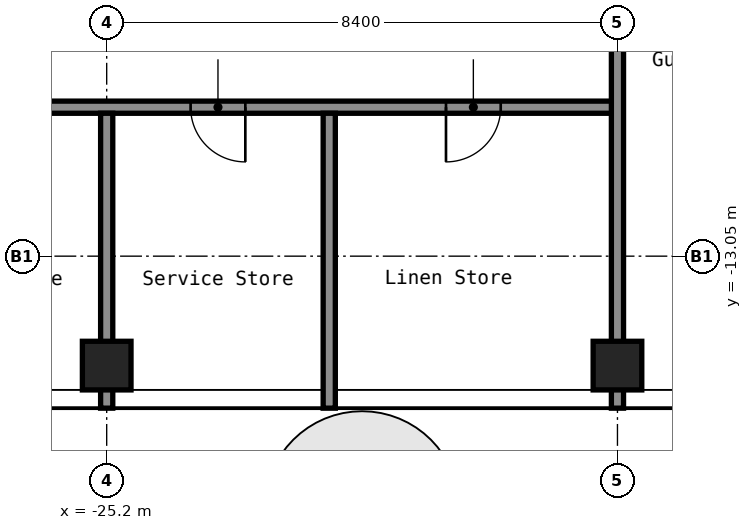
"""IFC4 building model, lengths in metres.
Left out: names, types, materials, properties, quantities, classifications, styles, units other than length and angle.
Written with IfcOpenShell. Run it as: python <this file> out.ifc"""

import sys

from ifc_helpers import new_model, si_unit, direction, frame, frame_2d, origin, origin_2d, place, context, subcontext, project, spatial, rectangle, hollow_rectangle, extrude, element, fill, save


model = new_model("IFC4")
c1 = context("Model", 3, precision=1e-05, world=origin(), true_north=direction((0.0, 1.0)))
c2 = subcontext(c1, "Body", "Model", "MODEL_VIEW")
j1 = project(units=[si_unit("LENGTHUNIT", "METRE"), si_unit("PLANEANGLEUNIT", "RADIAN")], contexts=[c1])
p1 = place(None, origin())
s1 = spatial("IfcSite", under=j1, at=p1, CompositionType="ELEMENT")
p2 = place(p1, origin())
s2 = spatial("IfcBuilding", under=s1, at=p2, CompositionType="ELEMENT")
p3 = place(p2, frame((0.0, 0.0, 85.0)))
s3 = spatial("IfcBuildingStorey", under=s2, at=p3, CompositionType="ELEMENT", Elevation=85.0)
for number, where, z_axis, x_axis in (
    (1, (-25.2, -14.85, 0.0), (0.0, 0.0, 1.0), (1.0, 0.0, 0.0)),
    (2, (-16.8, -14.85, 0.0), (0.0, 0.0, 1.0), (1.0, 0.0, 0.0)),
):
    element("IfcColumn", number, at=place(p3, frame(where, z_axis=z_axis, x_axis=x_axis)), inside=s3, PredefinedType="COLUMN", context=c2, shape_type="SweptSolid", body=[
        extrude(hollow_rectangle(XDim=0.8, YDim=0.8, WallThickness=0.032, at=origin_2d()), origin(), (0.0, 0.0, 1.0), 2.8),
    ])
p4 = place(p3, frame((-46.5, -10.6, 0.0), z_axis=(0.0, 0.0, 1.0), x_axis=(1.0, 0.0, 0.0)))
e3 = element("IfcWall", 3, at=p4, inside=s3, PredefinedType="PARTITIONING", context=c2, shape_type="SweptSolid", body=[
    extrude(rectangle(XDim=29.7, YDim=0.2, at=frame_2d((14.85, 0.0))), origin(), (0.0, 0.0, 1.0), 2.8),
])
p5 = place(p4, frame((1.95, 0.0, 0.0)))
e4 = element("IfcOpeningElement", 4, at=p5, cuts=e3, PredefinedType="OPENING", context=c2, shape_type="SweptSolid", body=[
    extrude(rectangle(XDim=0.9, YDim=2.1, at=frame_2d((0.45, 1.05))), frame((0.0, 0.11, 0.0), z_axis=(0.0, -1.0, 0.0), x_axis=(1.0, 0.0, 0.0)), (0.0, 0.0, 1.0), 0.22),
])
p6 = place(p4, frame((5.98, 0.0, 0.0)))
e5 = element("IfcOpeningElement", 5, at=p6, cuts=e3, PredefinedType="OPENING", context=c2, shape_type="SweptSolid", body=[
    extrude(rectangle(XDim=0.9, YDim=2.1, at=frame_2d((0.45, 1.05))), frame((0.0, 0.11, 0.0), z_axis=(0.0, -1.0, 0.0), x_axis=(1.0, 0.0, 0.0)), (0.0, 0.0, 1.0), 0.22),
])
p7 = place(p4, frame((10.18, 0.0, 0.0)))
e6 = element("IfcOpeningElement", 6, at=p7, cuts=e3, PredefinedType="OPENING", context=c2, shape_type="SweptSolid", body=[
    extrude(rectangle(XDim=0.9, YDim=2.1, at=frame_2d((0.45, 1.05))), frame((0.0, 0.11, 0.0), z_axis=(0.0, -1.0, 0.0), x_axis=(1.0, 0.0, 0.0)), (0.0, 0.0, 1.0), 0.22),
])
p8 = place(p4, frame((14.885, 0.0, 0.0)))
e7 = element("IfcOpeningElement", 7, at=p8, cuts=e3, PredefinedType="OPENING", context=c2, shape_type="SweptSolid", body=[
    extrude(rectangle(XDim=0.9, YDim=2.1, at=frame_2d((0.45, 1.05))), frame((0.0, 0.11, 0.0), z_axis=(0.0, -1.0, 0.0), x_axis=(1.0, 0.0, 0.0)), (0.0, 0.0, 1.0), 0.22),
])
p9 = place(p4, frame((19.085, 0.0, 0.0)))
e8 = element("IfcOpeningElement", 8, at=p9, cuts=e3, PredefinedType="OPENING", context=c2, shape_type="SweptSolid", body=[
    extrude(rectangle(XDim=0.9, YDim=2.1, at=frame_2d((0.45, 1.05))), frame((0.0, 0.11, 0.0), z_axis=(0.0, -1.0, 0.0), x_axis=(1.0, 0.0, 0.0)), (0.0, 0.0, 1.0), 0.22),
])
p10 = place(p4, frame((22.68, 0.0, 0.0)))
e9 = element("IfcOpeningElement", 9, at=p10, cuts=e3, PredefinedType="OPENING", context=c2, shape_type="SweptSolid", body=[
    extrude(rectangle(XDim=0.9, YDim=2.1, at=frame_2d((0.45, 1.05))), frame((0.0, 0.11, 0.0), z_axis=(0.0, -1.0, 0.0), x_axis=(1.0, 0.0, 0.0)), (0.0, 0.0, 1.0), 0.22),
])
p11 = place(p4, frame((26.88, 0.0, 0.0)))
e10 = element("IfcOpeningElement", 10, at=p11, cuts=e3, PredefinedType="OPENING", context=c2, shape_type="SweptSolid", body=[
    extrude(rectangle(XDim=0.9, YDim=2.1, at=frame_2d((0.45, 1.05))), frame((0.0, 0.11, 0.0), z_axis=(0.0, -1.0, 0.0), x_axis=(1.0, 0.0, 0.0)), (0.0, 0.0, 1.0), 0.22),
])
for number, where, z_axis, x_axis in (
    (11, (-25.2, -15.55, 0.0), (0.0, 0.0, 1.0), (0.0, 1.0, 0.0)),
    (12, (-21.54, -15.55, 0.0), (0.0, 0.0, 1.0), (0.0, 1.0, 0.0)),
):
    element("IfcWall", number, at=place(p3, frame(where, z_axis=z_axis, x_axis=x_axis)), inside=s3, PredefinedType="PARTITIONING", context=c2, shape_type="SweptSolid", body=[
        extrude(rectangle(XDim=4.85, YDim=0.2, at=frame_2d((2.425, 0.0))), origin(), (0.0, 0.0, 1.0), 2.8),
    ])
p12 = place(p3, frame((-16.8, -15.55, 0.0), z_axis=(0.0, 0.0, 1.0), x_axis=(0.0, 1.0, 0.0)))
e13 = element("IfcWall", 13, at=p12, inside=s3, PredefinedType="PARTITIONING", context=c2, shape_type="SweptSolid", body=[
    extrude(rectangle(XDim=7.16, YDim=0.2, at=frame_2d((3.58, 0.0))), origin(), (0.0, 0.0, 1.0), 2.8),
])
p13 = place(p10, origin())
e14 = element("IfcDoor", 14, at=p13, inside=s3, OperationType="SINGLE_SWING_RIGHT", PredefinedType="DOOR", context=c2, shape_type="SweptSolid", body=[
    extrude(rectangle(XDim=0.9, YDim=2.1, at=frame_2d((0.45, 1.05))), frame((0.0, 0.025, 0.0), z_axis=(0.0, -1.0, 0.0), x_axis=(1.0, 0.0, 0.0)), (0.0, 0.0, 1.0), 0.05),
])
fill(e9, e14)
p14 = place(p11, origin())
e15 = element("IfcDoor", 15, at=p14, inside=s3, OperationType="SINGLE_SWING_LEFT", PredefinedType="DOOR", context=c2, shape_type="SweptSolid", body=[
    extrude(rectangle(XDim=0.9, YDim=2.1, at=frame_2d((0.45, 1.05))), frame((0.0, 0.025, 0.0), z_axis=(0.0, -1.0, 0.0), x_axis=(1.0, 0.0, 0.0)), (0.0, 0.0, 1.0), 0.05),
])
fill(e10, e15)
save(model, sys.argv[1])
